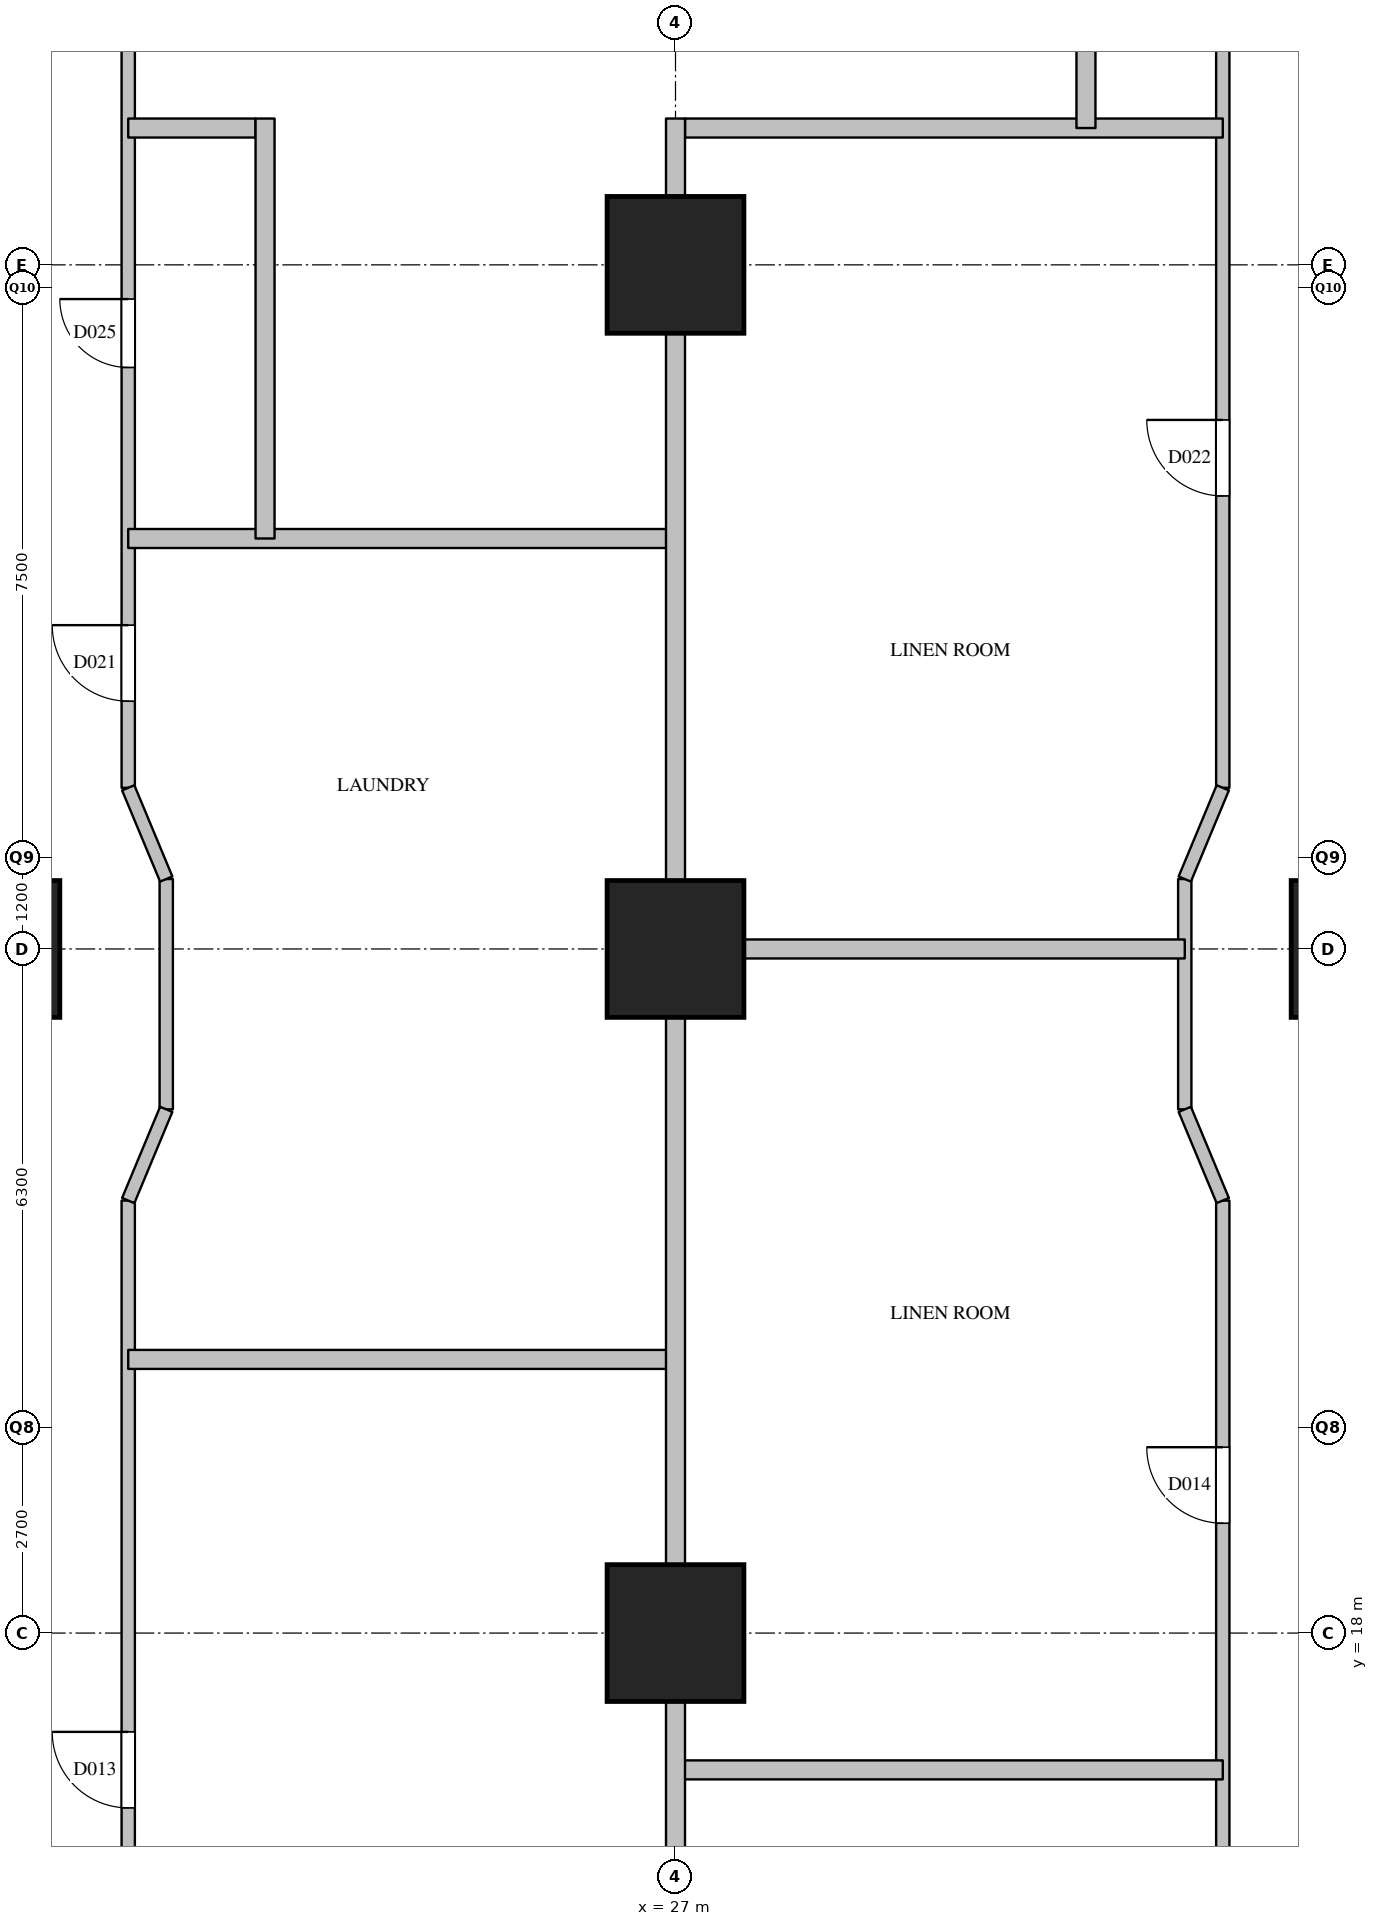
"""IFC4 building model, lengths in metres.
Left out: names, types, materials, properties, quantities, classifications, styles, units other than length and angle.
Written with IfcOpenShell. Run it as: python <this file> out.ifc"""

import sys

from ifc_helpers import new_model, si_unit, direction, frame, frame_2d, origin, origin_2d, place, context, subcontext, project, spatial, rectangle, extrude, element, fill, save


model = new_model("IFC4")
c1 = context("Model", 3, precision=1e-05, world=origin(), true_north=direction((0.0, 1.0)))
c2 = subcontext(c1, "Body", "Model", "MODEL_VIEW")
j1 = project(units=[si_unit("LENGTHUNIT", "METRE"), si_unit("PLANEANGLEUNIT", "RADIAN")], contexts=[c1])
p1 = place(None, origin())
s1 = spatial("IfcSite", under=j1, at=p1, CompositionType="ELEMENT")
p2 = place(p1, origin())
s2 = spatial("IfcBuilding", under=s1, at=p2, CompositionType="ELEMENT")
p3 = place(p2, frame((0.0, 0.0, 31.0)))
s3 = spatial("IfcBuildingStorey", under=s2, at=p3, CompositionType="ELEMENT", Elevation=31.0)
for number, where, z_axis, x_axis in (
    (1, (18.0, 27.0, 0.0), (0.0, 0.0, 1.0), (1.0, 0.0, 0.0)),
    (2, (27.0, 18.0, 0.0), (0.0, 0.0, 1.0), (1.0, 0.0, 0.0)),
    (3, (27.0, 27.0, 0.0), (0.0, 0.0, 1.0), (1.0, 0.0, 0.0)),
    (4, (27.0, 36.0, 0.0), (0.0, 0.0, 1.0), (1.0, 0.0, 0.0)),
    (5, (36.0, 27.0, 0.0), (0.0, 0.0, 1.0), (1.0, 0.0, 0.0)),
):
    element("IfcColumn", number, at=place(p3, frame(where, z_axis=z_axis, x_axis=x_axis)), inside=s3, PredefinedType="COLUMN", context=c2, shape_type="SweptSolid", body=[
        extrude(rectangle(XDim=1.8, YDim=1.8, at=origin_2d()), origin(), (0.0, 0.0, 1.0), 3.8),
    ])
p4 = place(p3, frame((19.8, 7.2, 0.0), z_axis=(0.0, 0.0, 1.0), x_axis=(0.0, 1.0, 0.0)))
e6 = element("IfcWall", 6, at=p4, inside=s3, PredefinedType="PARTITIONING", context=c2, shape_type="SweptSolid", body=[
    extrude(rectangle(XDim=16.49, YDim=0.175, at=frame_2d((8.245, 0.0))), origin(), (0.0, 0.0, 1.0), 3.5),
])
p5 = place(p4, frame((1.35, 0.0, 0.0)))
e7 = element("IfcOpeningElement", 7, at=p5, cuts=e6, PredefinedType="OPENING", context=c2, shape_type="SweptSolid", body=[
    extrude(rectangle(XDim=0.9, YDim=2.1, at=frame_2d((0.45, 1.05))), frame((0.0, 0.097, 0.0), z_axis=(0.0, -1.0, 0.0), x_axis=(1.0, 0.0, 0.0)), (0.0, 0.0, 1.0), 0.195),
])
p6 = place(p4, frame((8.5, 0.0, 0.0)))
e8 = element("IfcOpeningElement", 8, at=p6, cuts=e6, PredefinedType="OPENING", context=c2, shape_type="SweptSolid", body=[
    extrude(rectangle(XDim=1.0, YDim=2.1, at=frame_2d((0.5, 1.05))), frame((0.0, 0.097, 0.0), z_axis=(0.0, -1.0, 0.0), x_axis=(1.0, 0.0, 0.0)), (0.0, 0.0, 1.0), 0.195),
])
p7 = place(p3, frame((19.8, 29.12, 0.0), z_axis=(0.0, 0.0, 1.0), x_axis=(0.0, 1.0, 0.0)))
e9 = element("IfcWall", 9, at=p7, inside=s3, PredefinedType="PARTITIONING", context=c2, shape_type="SweptSolid", body=[
    extrude(rectangle(XDim=22.68, YDim=0.175, at=frame_2d((11.34, 0.0))), origin(), (0.0, 0.0, 1.0), 3.5),
])
p8 = place(p7, frame((1.14, 0.0, 0.0)))
e10 = element("IfcOpeningElement", 10, at=p8, cuts=e9, PredefinedType="OPENING", context=c2, shape_type="SweptSolid", body=[
    extrude(rectangle(XDim=1.0, YDim=2.1, at=frame_2d((0.5, 1.05))), frame((0.0, 0.097, 0.0), z_axis=(0.0, -1.0, 0.0), x_axis=(1.0, 0.0, 0.0)), (0.0, 0.0, 1.0), 0.195),
])
p9 = place(p7, frame((5.53, 0.0, 0.0)))
e11 = element("IfcOpeningElement", 11, at=p9, cuts=e9, PredefinedType="OPENING", context=c2, shape_type="SweptSolid", body=[
    extrude(rectangle(XDim=0.9, YDim=2.1, at=frame_2d((0.45, 1.05))), frame((0.0, 0.097, 0.0), z_axis=(0.0, -1.0, 0.0), x_axis=(1.0, 0.0, 0.0)), (0.0, 0.0, 1.0), 0.195),
])
p10 = place(p7, frame((15.23, 0.0, 0.0)))
e12 = element("IfcOpeningElement", 12, at=p10, cuts=e9, PredefinedType="OPENING", context=c2, shape_type="SweptSolid", body=[
    extrude(rectangle(XDim=0.9, YDim=2.1, at=frame_2d((0.45, 1.05))), frame((0.0, 0.097, 0.0), z_axis=(0.0, -1.0, 0.0), x_axis=(1.0, 0.0, 0.0)), (0.0, 0.0, 1.0), 0.195),
])
for number, where, z_axis, x_axis in (
    (13, (20.3, 24.89, 0.0), (0.0, 0.0, 1.0), (0.0, 1.0, 0.0)),
    (14, (33.7, 24.89, 0.0), (0.0, 0.0, 1.0), (0.0, 1.0, 0.0)),
):
    element("IfcWall", number, at=place(p3, frame(where, z_axis=z_axis, x_axis=x_axis)), inside=s3, PredefinedType="PARTITIONING", context=c2, shape_type="SweptSolid", body=[
        extrude(rectangle(XDim=3.03, YDim=0.175, at=frame_2d((1.515, 0.0))), origin(), (0.0, 0.0, 1.0), 2.5),
    ])
p11 = place(p3, frame((34.2, 7.2, 0.0), z_axis=(0.0, 0.0, 1.0), x_axis=(0.0, 1.0, 0.0)))
e15 = element("IfcWall", 15, at=p11, inside=s3, PredefinedType="PARTITIONING", context=c2, shape_type="SweptSolid", body=[
    extrude(rectangle(XDim=16.49, YDim=0.175, at=frame_2d((8.245, 0.0))), origin(), (0.0, 0.0, 1.0), 3.5),
])
p12 = place(p11, frame((5.8, 0.0, 0.0)))
e16 = element("IfcOpeningElement", 16, at=p12, cuts=e15, PredefinedType="OPENING", context=c2, shape_type="SweptSolid", body=[
    extrude(rectangle(XDim=1.0, YDim=2.1, at=frame_2d((0.5, 1.05))), frame((0.0, 0.097, 0.0), z_axis=(0.0, -1.0, 0.0), x_axis=(1.0, 0.0, 0.0)), (0.0, 0.0, 1.0), 0.195),
])
p13 = place(p11, frame((12.245, 0.0, 0.0)))
e17 = element("IfcOpeningElement", 17, at=p13, cuts=e15, PredefinedType="OPENING", context=c2, shape_type="SweptSolid", body=[
    extrude(rectangle(XDim=1.0, YDim=2.1, at=frame_2d((0.5, 1.05))), frame((0.0, 0.097, 0.0), z_axis=(0.0, -1.0, 0.0), x_axis=(1.0, 0.0, 0.0)), (0.0, 0.0, 1.0), 0.195),
])
p14 = place(p3, frame((34.2, 29.12, 0.0), z_axis=(0.0, 0.0, 1.0), x_axis=(0.0, 1.0, 0.0)))
e18 = element("IfcWall", 18, at=p14, inside=s3, PredefinedType="PARTITIONING", context=c2, shape_type="SweptSolid", body=[
    extrude(rectangle(XDim=22.68, YDim=0.175, at=frame_2d((11.34, 0.0))), origin(), (0.0, 0.0, 1.0), 3.5),
])
p15 = place(p14, frame((3.84, 0.0, 0.0)))
e19 = element("IfcOpeningElement", 19, at=p15, cuts=e18, PredefinedType="OPENING", context=c2, shape_type="SweptSolid", body=[
    extrude(rectangle(XDim=1.0, YDim=2.1, at=frame_2d((0.5, 1.05))), frame((0.0, 0.097, 0.0), z_axis=(0.0, -1.0, 0.0), x_axis=(1.0, 0.0, 0.0)), (0.0, 0.0, 1.0), 0.195),
])
p16 = place(p14, frame((13.646, 0.0, 0.0)))
e20 = element("IfcOpeningElement", 20, at=p16, cuts=e18, PredefinedType="OPENING", context=c2, shape_type="SweptSolid", body=[
    extrude(rectangle(XDim=1.0, YDim=2.1, at=frame_2d((0.5, 1.05))), frame((0.0, 0.097, 0.0), z_axis=(0.0, -1.0, 0.0), x_axis=(1.0, 0.0, 0.0)), (0.0, 0.0, 1.0), 0.195),
])
for number, where, z_axis, x_axis in (
    (21, (27.0, 16.2, 0.0), (0.0, 0.0, 1.0), (1.0, 0.0, 0.0)),
    (22, (19.8, 21.6, 0.0), (0.0, 0.0, 1.0), (1.0, 0.0, 0.0)),
):
    element("IfcWall", number, at=place(p3, frame(where, z_axis=z_axis, x_axis=x_axis)), inside=s3, PredefinedType="PARTITIONING", context=c2, shape_type="SweptSolid", body=[
        extrude(rectangle(XDim=7.2, YDim=0.25, at=frame_2d((3.6, 0.0))), origin(), (0.0, 0.0, 1.0), 2.5),
    ])
p17 = place(p3, frame((27.0, 27.0, 0.0), z_axis=(0.0, 0.0, 1.0), x_axis=(1.0, 0.0, 0.0)))
e23 = element("IfcWall", 23, at=p17, inside=s3, PredefinedType="PARTITIONING", context=c2, shape_type="SweptSolid", body=[
    extrude(rectangle(XDim=6.7, YDim=0.25, at=frame_2d((3.35, 0.0))), origin(), (0.0, 0.0, 1.0), 2.5),
])
p18 = place(p3, frame((19.8, 32.4, 0.0), z_axis=(0.0, 0.0, 1.0), x_axis=(1.0, 0.0, 0.0)))
e24 = element("IfcWall", 24, at=p18, inside=s3, PredefinedType="PARTITIONING", context=c2, shape_type="SweptSolid", body=[
    extrude(rectangle(XDim=7.2, YDim=0.25, at=frame_2d((3.6, 0.0))), origin(), (0.0, 0.0, 1.0), 2.5),
])
p19 = place(p3, frame((19.8, 37.8, 0.0), z_axis=(0.0, 0.0, 1.0), x_axis=(1.0, 0.0, 0.0)))
e25 = element("IfcWall", 25, at=p19, inside=s3, PredefinedType="PARTITIONING", context=c2, shape_type="SweptSolid", body=[
    extrude(rectangle(XDim=1.675, YDim=0.25, at=frame_2d((0.837, 0.0))), origin(), (0.0, 0.0, 1.0), 3.5),
])
p20 = place(p3, frame((27.125, 37.8, 0.0), z_axis=(0.0, 0.0, 1.0), x_axis=(1.0, 0.0, 0.0)))
e26 = element("IfcWall", 26, at=p20, inside=s3, PredefinedType="PARTITIONING", context=c2, shape_type="SweptSolid", body=[
    extrude(rectangle(XDim=7.075, YDim=0.25, at=frame_2d((3.538, 0.0))), origin(), (0.0, 0.0, 1.0), 2.5),
])
p21 = place(p3, frame((21.6, 32.4, 0.0), z_axis=(0.0, 0.0, 1.0), x_axis=(0.0, 1.0, 0.0)))
e27 = element("IfcWall", 27, at=p21, inside=s3, PredefinedType="PARTITIONING", context=c2, shape_type="SweptSolid", body=[
    extrude(rectangle(XDim=5.525, YDim=0.25, at=frame_2d((2.763, 0.0))), origin(), (0.0, 0.0, 1.0), 3.5),
])
p22 = place(p3, frame((27.0, 0.0, 0.0), z_axis=(0.0, 0.0, 1.0), x_axis=(0.0, 1.0, 0.0)))
e28 = element("IfcWall", 28, at=p22, inside=s3, PredefinedType="PARTITIONING", context=c2, shape_type="SweptSolid", body=[
    extrude(rectangle(XDim=37.925, YDim=0.25, at=frame_2d((18.962, 0.0))), origin(), (0.0, 0.0, 1.0), 2.5),
])
p23 = place(p3, frame((32.4, 37.8, 0.0), z_axis=(0.0, 0.0, 1.0), x_axis=(0.0, 1.0, 0.0)))
e29 = element("IfcWall", 29, at=p23, inside=s3, PredefinedType="PARTITIONING", context=c2, shape_type="SweptSolid", body=[
    extrude(rectangle(XDim=16.2, YDim=0.25, at=frame_2d((8.1, 0.0))), origin(), (0.0, 0.0, 1.0), 2.5),
])
p24 = place(p3, frame((34.2, 23.69, 0.0), z_axis=(0.0, 0.0, 1.0), x_axis=(-0.384628719983, 0.923071366561, 0.0)))
e30 = element("IfcWall", 30, at=p24, inside=s3, PredefinedType="PARTITIONING", context=c2, shape_type="SweptSolid", body=[
    extrude(rectangle(XDim=1.3, YDim=0.175, at=frame_2d((0.65, 0.0))), origin(), (0.0, 0.0, 1.0), 3.5),
])
for number, where, z_axis, x_axis in (
    (31, (33.7, 27.92, 0.0), (0.0, 0.0, 1.0), (0.385, 0.923, 0.0)),
    (32, (19.8, 29.12, 0.0), (0.0, 0.0, 1.0), (0.385, -0.923, 0.0)),
):
    element("IfcWall", number, at=place(p3, frame(where, z_axis=z_axis, x_axis=x_axis)), inside=s3, PredefinedType="PARTITIONING", context=c2, shape_type="SweptSolid", body=[
        extrude(rectangle(XDim=1.3, YDim=0.175, at=frame_2d((0.65, 0.0))), origin(), (0.0, 0.0, 1.0), 3.5),
    ])
p25 = place(p3, frame((20.3, 24.89, 0.0), z_axis=(0.0, 0.0, 1.0), x_axis=(-0.384628719983, -0.923071366561, 0.0)))
e33 = element("IfcWall", 33, at=p25, inside=s3, PredefinedType="PARTITIONING", context=c2, shape_type="SweptSolid", body=[
    extrude(rectangle(XDim=1.3, YDim=0.175, at=frame_2d((0.65, 0.0))), origin(), (0.0, 0.0, 1.0), 3.5),
])
p26 = place(p6, origin())
e34 = element("IfcDoor", 34, at=p26, inside=s3, OperationType="SINGLE_SWING_RIGHT", PredefinedType="DOOR", context=c2, shape_type="SweptSolid", body=[
    extrude(rectangle(XDim=1.0, YDim=2.1, at=frame_2d((0.5, 1.05))), frame((0.0, 0.025, 0.0), z_axis=(0.0, -1.0, 0.0), x_axis=(1.0, 0.0, 0.0)), (0.0, 0.0, 1.0), 0.05),
])
fill(e8, e34)
p27 = place(p13, origin())
e35 = element("IfcDoor", 35, at=p27, inside=s3, OperationType="SINGLE_SWING_RIGHT", PredefinedType="DOOR", context=c2, shape_type="SweptSolid", body=[
    extrude(rectangle(XDim=1.0, YDim=2.1, at=frame_2d((0.5, 1.05))), frame((0.0, 0.025, 0.0), z_axis=(0.0, -1.0, 0.0), x_axis=(1.0, 0.0, 0.0)), (0.0, 0.0, 1.0), 0.05),
])
fill(e17, e35)
p28 = place(p8, origin())
e36 = element("IfcDoor", 36, at=p28, inside=s3, OperationType="SINGLE_SWING_RIGHT", PredefinedType="DOOR", context=c2, shape_type="SweptSolid", body=[
    extrude(rectangle(XDim=1.0, YDim=2.1, at=frame_2d((0.5, 1.05))), frame((0.0, 0.025, 0.0), z_axis=(0.0, -1.0, 0.0), x_axis=(1.0, 0.0, 0.0)), (0.0, 0.0, 1.0), 0.05),
])
fill(e10, e36)
p29 = place(p15, origin())
e37 = element("IfcDoor", 37, at=p29, inside=s3, OperationType="SINGLE_SWING_RIGHT", PredefinedType="DOOR", context=c2, shape_type="SweptSolid", body=[
    extrude(rectangle(XDim=1.0, YDim=2.1, at=frame_2d((0.5, 1.05))), frame((0.0, 0.025, 0.0), z_axis=(0.0, -1.0, 0.0), x_axis=(1.0, 0.0, 0.0)), (0.0, 0.0, 1.0), 0.05),
])
fill(e19, e37)
p30 = place(p9, origin())
e38 = element("IfcDoor", 38, at=p30, inside=s3, OperationType="SINGLE_SWING_RIGHT", PredefinedType="DOOR", context=c2, shape_type="SweptSolid", body=[
    extrude(rectangle(XDim=0.9, YDim=2.1, at=frame_2d((0.45, 1.05))), frame((0.0, 0.025, 0.0), z_axis=(0.0, -1.0, 0.0), x_axis=(1.0, 0.0, 0.0)), (0.0, 0.0, 1.0), 0.05),
])
fill(e11, e38)
save(model, sys.argv[1])
